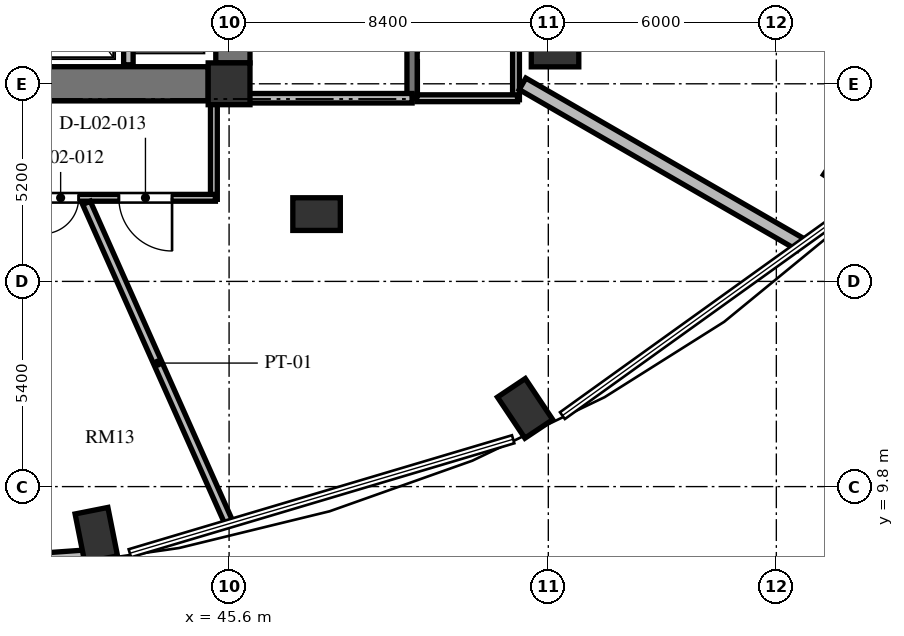
"""IFC4 building model, lengths in metres.
Left out: names, types, materials, properties, quantities, classifications, styles, units other than length and angle.
Written with IfcOpenShell. Run it as: python <this file> out.ifc"""

import sys

from ifc_helpers import new_model, si_unit, direction, frame, frame_2d, origin, origin_2d, place, context, subcontext, project, spatial, rectangle, extrude, element, fill, save


model = new_model("IFC4")
c1 = context("Model", 3, precision=1e-05, world=origin(), true_north=direction((0.0, 1.0)))
c2 = subcontext(c1, "Body", "Model", "MODEL_VIEW")
j1 = project(units=[si_unit("LENGTHUNIT", "METRE"), si_unit("PLANEANGLEUNIT", "RADIAN")], contexts=[c1])
p1 = place(None, origin())
s1 = spatial("IfcSite", under=j1, at=p1, CompositionType="ELEMENT")
p2 = place(p1, origin())
s2 = spatial("IfcBuilding", under=s1, at=p2, CompositionType="ELEMENT")
p3 = place(p2, frame((0.0, 0.0, 10.8)))
s3 = spatial("IfcBuildingStorey", under=s2, at=p3, CompositionType="ELEMENT", Elevation=10.8)
for number, where, z_axis, x_axis in (
    (1, (42.106, 8.529, 0.0), (0.0, 0.0, 1.0), (0.195, -0.981, 0.0)),
    (2, (53.389, 11.858, 0.0), (0.0, 0.0, 1.0), (0.556, -0.831, 0.0)),
    (3, (62.025, 18.011, 0.0), (0.0, 0.0, 1.0), (0.831, -0.556, 0.0)),
):
    element("IfcColumn", number, at=place(p3, frame(where, z_axis=z_axis, x_axis=x_axis)), inside=s3, PredefinedType="COLUMN", context=c2, shape_type="SweptSolid", body=[
        extrude(rectangle(XDim=1.3, YDim=0.88, at=origin_2d()), origin(), (0.0, 0.0, 1.0), 4.8),
    ])
p4 = place(p3, frame((45.6, 20.4, 0.0), z_axis=(0.0, 0.0, 1.0), x_axis=(1.0, 0.0, 0.0)))
e4 = element("IfcColumn", 4, at=p4, inside=s3, PredefinedType="COLUMN", context=c2, shape_type="SweptSolid", body=[
    extrude(rectangle(XDim=1.1, YDim=1.1, at=origin_2d()), origin(), (0.0, 0.0, 1.0), 4.8),
])
for number, where, z_axis, x_axis in (
    (5, (47.902, 16.971, 0.0), (0.0, 0.0, 1.0), (1.0, 0.0, 0.0)),
    (6, (54.177, 21.276, 0.0), (0.0, 0.0, 1.0), (1.0, 0.0, 0.0)),
):
    element("IfcColumn", number, at=place(p3, frame(where, z_axis=z_axis, x_axis=x_axis)), inside=s3, PredefinedType="COLUMN", context=c2, shape_type="SweptSolid", body=[
        extrude(rectangle(XDim=1.25, YDim=0.86, at=origin_2d()), origin(), (0.0, 0.0, 1.0), 4.8),
    ])
p5 = place(p3, frame((45.7, 20.95, 0.0), z_axis=(0.0, 0.0, 1.0), x_axis=(0.0, 1.0, 0.0)))
e7 = element("IfcWall", 7, at=p5, inside=s3, PredefinedType="SHEAR", context=c2, shape_type="SweptSolid", body=[
    extrude(rectangle(XDim=14.1, YDim=0.9, at=frame_2d((7.05, 0.0))), origin(), (0.0, 0.0, 1.0), 4.8),
])
p6 = place(p5, frame((11.75, 0.0, 0.0)))
e8 = element("IfcOpeningElement", 8, at=p6, cuts=e7, PredefinedType="OPENING", context=c2, shape_type="SweptSolid", body=[
    extrude(rectangle(XDim=1.4, YDim=2.3, at=frame_2d((0.7, 1.15))), frame((0.0, 0.46, 0.0), z_axis=(0.0, -1.0, 0.0), x_axis=(1.0, 0.0, 0.0)), (0.0, 0.0, 1.0), 0.92),
])
p7 = place(p5, frame((0.95, 0.0, 0.0)))
e9 = element("IfcOpeningElement", 9, at=p7, cuts=e7, PredefinedType="OPENING", context=c2, shape_type="SweptSolid", body=[
    extrude(rectangle(XDim=1.4, YDim=2.3, at=frame_2d((0.7, 1.15))), frame((0.0, 0.46, 0.0), z_axis=(0.0, -1.0, 0.0), x_axis=(1.0, 0.0, 0.0)), (0.0, 0.0, 1.0), 0.92),
])
p8 = place(p3, frame((39.75, 20.4, 0.0), z_axis=(0.0, 0.0, 1.0), x_axis=(1.0, 0.0, 0.0)))
e10 = element("IfcWall", 10, at=p8, inside=s3, PredefinedType="SHEAR", context=c2, shape_type="SweptSolid", body=[
    extrude(rectangle(XDim=5.3, YDim=0.9, at=frame_2d((2.65, 0.0))), origin(), (0.0, 0.0, 1.0), 4.8),
])
p9 = place(p3, frame((35.82, 7.547, 0.0), z_axis=(0.0, 0.0, 1.0), x_axis=(0.99751367159, 0.070473221795, 0.0)))
e11 = element("IfcWall", 11, at=p9, inside=s3, PredefinedType="SOLIDWALL", context=c2, shape_type="SweptSolid", body=[
    extrude(rectangle(XDim=6.458, YDim=0.32, at=frame_2d((3.229, 0.0))), origin(), (0.0, 0.0, 1.0), 4.52),
])
p10 = place(p9, frame((2.329, 0.0, 0.85)))
e12 = element("IfcOpeningElement", 12, at=p10, cuts=e11, PredefinedType="OPENING", context=c2, shape_type="SweptSolid", body=[
    extrude(rectangle(XDim=1.8, YDim=2.4, at=frame_2d((0.9, 1.2))), frame((0.0, 0.17, 0.0), z_axis=(0.0, -1.0, 0.0), x_axis=(1.0, 0.0, 0.0)), (0.0, 0.0, 1.0), 0.34),
])
p11 = place(p3, frame((42.95, 20.9, 0.0), z_axis=(0.0, 0.0, 1.0), x_axis=(0.0, 1.0, 0.0)))
e13 = element("IfcWall", 13, at=p11, inside=s3, PredefinedType="SOLIDWALL", context=c2, shape_type="SweptSolid", body=[
    extrude(rectangle(XDim=3.2, YDim=0.25, at=frame_2d((1.6, 0.0))), origin(), (0.0, 0.0, 1.0), 4.52),
])
p12 = place(p3, frame((50.415, 35.845, 0.0), z_axis=(0.0, 0.0, 1.0), x_axis=(0.0, -1.0, 0.0)))
e14 = element("IfcWall", 14, at=p12, inside=s3, PredefinedType="SHEAR", context=c2, shape_type="SweptSolid", body=[
    extrude(rectangle(XDim=15.825, YDim=0.27, at=frame_2d((7.913, 0.0))), origin(), (0.0, 0.0, 1.0), 4.8),
])
p13 = place(p12, frame((4.445, 0.0, 0.0)))
e15 = element("IfcOpeningElement", 15, at=p13, cuts=e14, PredefinedType="OPENING", context=c2, shape_type="SweptSolid", body=[
    extrude(rectangle(XDim=1.2, YDim=2.15, at=frame_2d((0.6, 1.075))), frame((0.0, 0.145, 0.0), z_axis=(0.0, -1.0, 0.0), x_axis=(1.0, 0.0, 0.0)), (0.0, 0.0, 1.0), 0.29),
])
p14 = place(p12, frame((1.295, 0.0, 0.0)))
e16 = element("IfcOpeningElement", 16, at=p14, cuts=e14, PredefinedType="OPENING", context=c2, shape_type="SweptSolid", body=[
    extrude(rectangle(XDim=1.3, YDim=2.2, at=frame_2d((0.65, 1.1))), frame((0.0, 0.145, 0.0), z_axis=(0.0, -1.0, 0.0), x_axis=(1.0, 0.0, 0.0)), (0.0, 0.0, 1.0), 0.29),
])
p15 = place(p12, frame((13.095, 0.0, 0.0)))
e17 = element("IfcOpeningElement", 17, at=p15, cuts=e14, PredefinedType="OPENING", context=c2, shape_type="SweptSolid", body=[
    extrude(rectangle(XDim=1.3, YDim=2.2, at=frame_2d((0.65, 1.1))), frame((0.0, 0.145, 0.0), z_axis=(0.0, -1.0, 0.0), x_axis=(1.0, 0.0, 0.0)), (0.0, 0.0, 1.0), 0.29),
])
p16 = place(p3, frame((45.7, 20.02, 0.0), z_axis=(0.0, 0.0, 1.0), x_axis=(1.0, 0.0, 0.0)))
e18 = element("IfcWall", 18, at=p16, inside=s3, PredefinedType="SOLIDWALL", context=c2, shape_type="SweptSolid", body=[
    extrude(rectangle(XDim=4.715, YDim=0.25, at=frame_2d((2.357, 0.0))), origin(), (0.0, 0.0, 1.0), 4.52),
])
p17 = place(p3, frame((53.15, 26.64, 0.0), z_axis=(0.0, 0.0, 1.0), x_axis=(0.0, -1.0, 0.0)))
e19 = element("IfcWall", 19, at=p17, inside=s3, PredefinedType="PARTITIONING", context=c2, shape_type="SweptSolid", body=[
    extrude(rectangle(XDim=6.66, YDim=0.18, at=frame_2d((3.33, 0.0))), origin(), (0.0, 0.0, 1.0), 4.52),
])
p18 = place(p17, frame((2.671, 0.0, 0.0)))
e20 = element("IfcOpeningElement", 20, at=p18, cuts=e19, PredefinedType="OPENING", context=c2, shape_type="SweptSolid", body=[
    extrude(rectangle(XDim=1.05, YDim=2.15, at=frame_2d((0.525, 1.075))), frame((0.0, 0.1, 0.0), z_axis=(0.0, -1.0, 0.0), x_axis=(1.0, 0.0, 0.0)), (0.0, 0.0, 1.0), 0.2),
])
p19 = place(p3, frame((53.19, 20.02, 0.0), z_axis=(0.0, 0.0, 1.0), x_axis=(-1.0, 0.0, 0.0)))
e21 = element("IfcWall", 21, at=p19, inside=s3, PredefinedType="PARTITIONING", context=c2, shape_type="SweptSolid", body=[
    extrude(rectangle(XDim=2.65, YDim=0.18, at=frame_2d((1.325, 0.0))), origin(), (0.0, 0.0, 1.0), 4.52),
])
p20 = place(p3, frame((45.2, 19.91, 0.0), z_axis=(0.0, 0.0, 1.0), x_axis=(0.0, -1.0, 0.0)))
e22 = element("IfcWall", 22, at=p20, inside=s3, PredefinedType="PARTITIONING", context=c2, shape_type="SweptSolid", body=[
    extrude(rectangle(XDim=2.55, YDim=0.18, at=frame_2d((1.275, 0.0))), origin(), (0.0, 0.0, 1.0), 4.52),
])
p21 = place(p3, frame((45.24, 17.4, 0.0), z_axis=(0.0, 0.0, 1.0), x_axis=(-1.0, 0.0, 0.0)))
e23 = element("IfcWall", 23, at=p21, inside=s3, PredefinedType="PARTITIONING", context=c2, shape_type="SweptSolid", body=[
    extrude(rectangle(XDim=21.93, YDim=0.18, at=frame_2d((10.965, 0.0))), origin(), (0.0, 0.0, 1.0), 4.52),
])
p22 = place(p21, frame((14.496, 0.0, 0.0)))
e24 = element("IfcOpeningElement", 24, at=p22, cuts=e23, PredefinedType="OPENING", context=c2, shape_type="SweptSolid", body=[
    extrude(rectangle(XDim=0.95, YDim=2.1, at=frame_2d((0.475, 1.05))), frame((0.0, 0.1, 0.0), z_axis=(0.0, -1.0, 0.0), x_axis=(1.0, 0.0, 0.0)), (0.0, 0.0, 1.0), 0.2),
])
p23 = place(p21, frame((8.49, 0.0, 0.0)))
e25 = element("IfcOpeningElement", 25, at=p23, cuts=e23, PredefinedType="OPENING", context=c2, shape_type="SweptSolid", body=[
    extrude(rectangle(XDim=0.95, YDim=2.1, at=frame_2d((0.475, 1.05))), frame((0.0, 0.1, 0.0), z_axis=(0.0, -1.0, 0.0), x_axis=(1.0, 0.0, 0.0)), (0.0, 0.0, 1.0), 0.2),
])
p24 = place(p21, frame((3.597, 0.0, 0.0)))
e26 = element("IfcOpeningElement", 26, at=p24, cuts=e23, PredefinedType="OPENING", context=c2, shape_type="SweptSolid", body=[
    extrude(rectangle(XDim=0.95, YDim=2.1, at=frame_2d((0.475, 1.05))), frame((0.0, 0.1, 0.0), z_axis=(0.0, -1.0, 0.0), x_axis=(1.0, 0.0, 0.0)), (0.0, 0.0, 1.0), 0.2),
])
p25 = place(p21, frame((1.141, 0.0, 0.0)))
e27 = element("IfcOpeningElement", 27, at=p25, cuts=e23, PredefinedType="OPENING", context=c2, shape_type="SweptSolid", body=[
    extrude(rectangle(XDim=1.4, YDim=2.2, at=frame_2d((0.7, 1.1))), frame((0.0, 0.1, 0.0), z_axis=(0.0, -1.0, 0.0), x_axis=(1.0, 0.0, 0.0)), (0.0, 0.0, 1.0), 0.2),
])
p26 = place(p3, frame((41.847, 17.267, 0.0), z_axis=(0.0, 0.0, 1.0), x_axis=(0.406746917765, -0.913540882987, 0.0)))
e28 = element("IfcWall", 28, at=p26, inside=s3, PredefinedType="PARTITIONING", context=c2, shape_type="SweptSolid", body=[
    extrude(rectangle(XDim=9.231, YDim=0.22, at=frame_2d((4.616, 0.0))), origin(), (0.0, 0.0, 1.0), 4.52),
])
p27 = place(p3, frame((53.322, 20.399, 0.0), z_axis=(0.0, 0.0, 1.0), x_axis=(0.866024398109, -0.500001741877, 0.0)))
e29 = element("IfcWall", 29, at=p27, inside=s3, PredefinedType="SOLIDWALL", context=c2, shape_type="SweptSolid", body=[
    extrude(rectangle(XDim=8.45, YDim=0.35, at=frame_2d((4.225, 0.0))), origin(), (0.0, 0.0, 1.0), 4.52),
])
p28 = place(p24, origin())
e30 = element("IfcDoor", 30, at=p28, inside=s3, OperationType="SINGLE_SWING_RIGHT", PredefinedType="DOOR", context=c2, shape_type="SweptSolid", body=[
    extrude(rectangle(XDim=0.95, YDim=2.1, at=frame_2d((0.475, 1.05))), frame((0.0, 0.025, 0.0), z_axis=(0.0, -1.0, 0.0), x_axis=(1.0, 0.0, 0.0)), (0.0, 0.0, 1.0), 0.05),
])
fill(e26, e30)
p29 = place(p25, origin())
e31 = element("IfcDoor", 31, at=p29, inside=s3, OperationType="SINGLE_SWING_LEFT", PredefinedType="DOOR", context=c2, shape_type="SweptSolid", body=[
    extrude(rectangle(XDim=1.4, YDim=2.2, at=frame_2d((0.7, 1.1))), frame((0.0, 0.025, 0.0), z_axis=(0.0, -1.0, 0.0), x_axis=(1.0, 0.0, 0.0)), (0.0, 0.0, 1.0), 0.05),
])
fill(e27, e31)
save(model, sys.argv[1])
